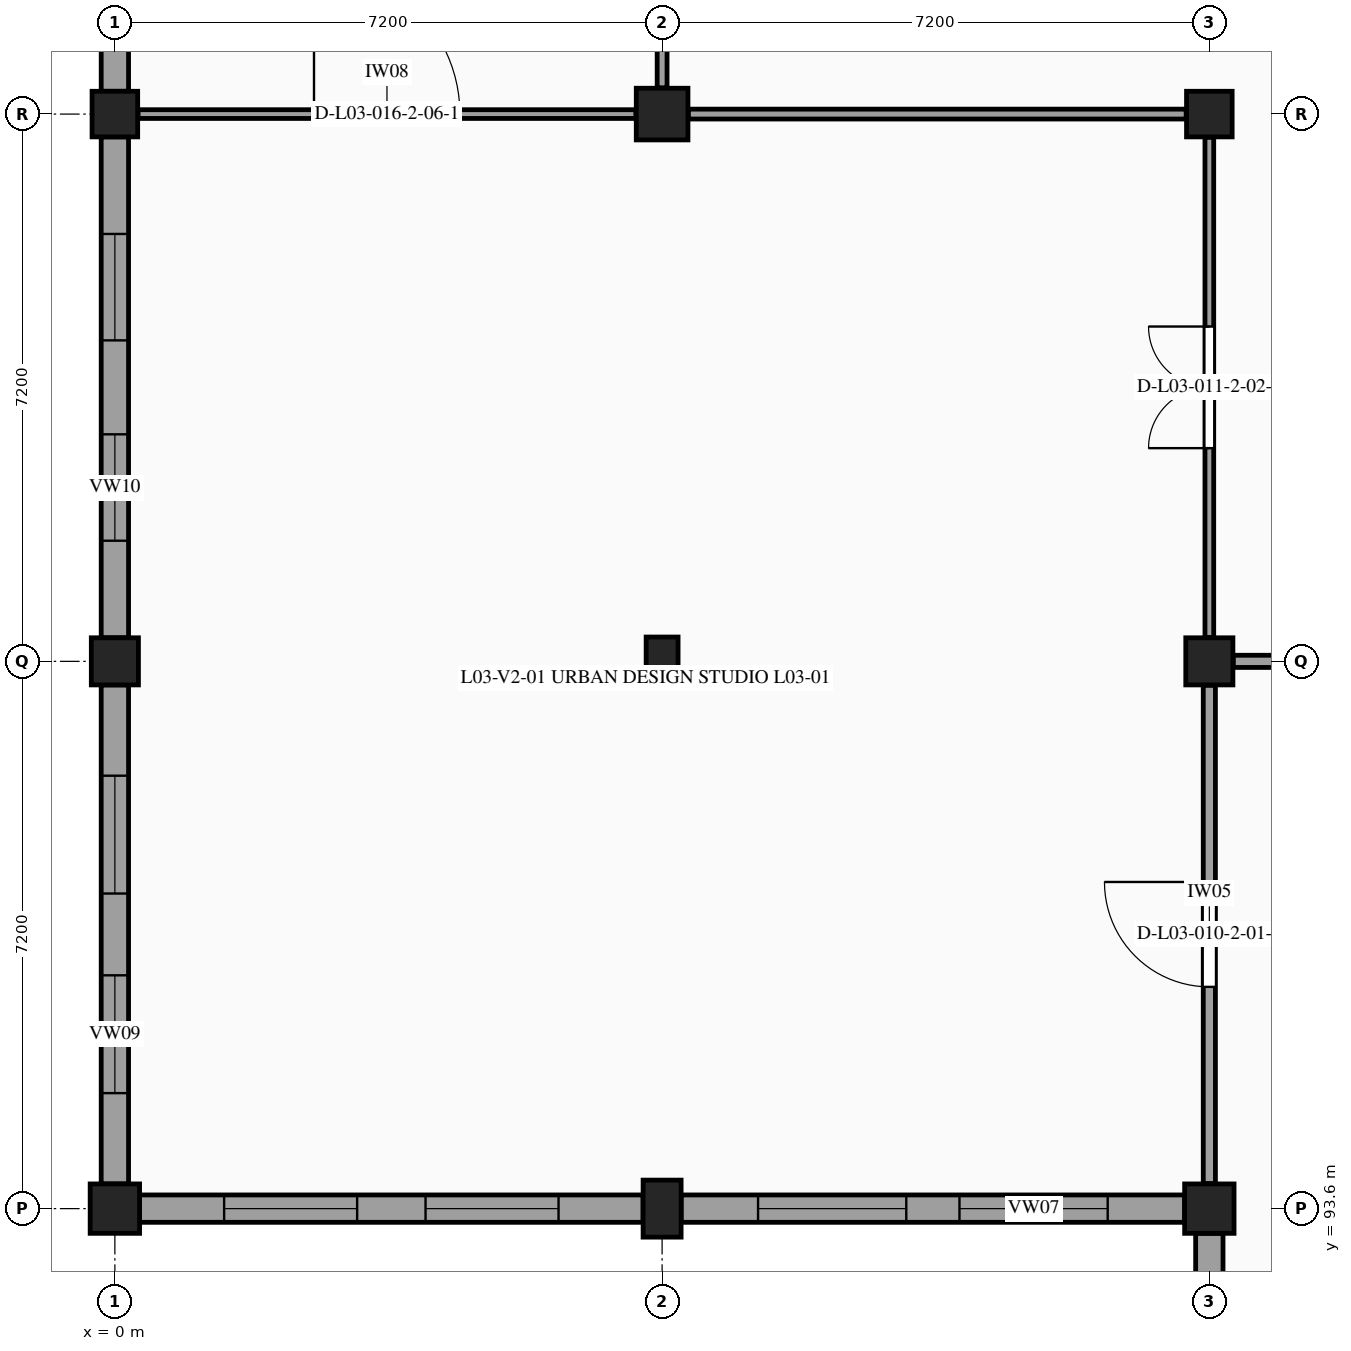
"""IFC4 building model, lengths in metres.
Left out: names, types, materials, properties, quantities, classifications, styles, units other than length and angle.
Written with IfcOpenShell. Run it as: python <this file> out.ifc"""

import sys

from ifc_helpers import new_model, si_unit, direction, frame, frame_2d, origin, origin_2d, place, context, subcontext, project, spatial, rectangle, extrude, element, fill, save


model = new_model("IFC4")
c1 = context("Model", 3, precision=1e-05, world=origin(), true_north=direction((0.0, 1.0)))
c2 = subcontext(c1, "Body", "Model", "MODEL_VIEW")
j1 = project(units=[si_unit("LENGTHUNIT", "METRE"), si_unit("PLANEANGLEUNIT", "RADIAN")], contexts=[c1])
p1 = place(None, origin())
s1 = spatial("IfcSite", under=j1, at=p1, CompositionType="ELEMENT")
p2 = place(p1, origin())
s2 = spatial("IfcBuilding", under=s1, at=p2, CompositionType="ELEMENT")
p3 = place(p2, frame((0.0, 0.0, 14.4)))
s3 = spatial("IfcBuildingStorey", under=s2, at=p3, CompositionType="ELEMENT", Elevation=14.4)
p4 = place(p3, frame((0.0, 93.6, 0.0), z_axis=(0.0, 0.0, 1.0), x_axis=(1.0, 0.0, 0.0)))
e1 = element("IfcColumn", 1, at=p4, inside=s3, PredefinedType="COLUMN", context=c2, shape_type="SweptSolid", body=[
    extrude(rectangle(XDim=0.65, YDim=0.65, at=origin_2d()), origin(), (0.0, 0.0, 1.0), 4.2),
])
p5 = place(p3, frame((0.0, 100.8, 0.0), z_axis=(0.0, 0.0, 1.0), x_axis=(1.0, 0.0, 0.0)))
e2 = element("IfcColumn", 2, at=p5, inside=s3, PredefinedType="COLUMN", context=c2, shape_type="SweptSolid", body=[
    extrude(rectangle(XDim=0.62, YDim=0.62, at=origin_2d()), origin(), (0.0, 0.0, 1.0), 4.2),
])
p6 = place(p3, frame((0.0, 108.0, 0.0), z_axis=(0.0, 0.0, 1.0), x_axis=(1.0, 0.0, 0.0)))
e3 = element("IfcColumn", 3, at=p6, inside=s3, PredefinedType="COLUMN", context=c2, shape_type="SweptSolid", body=[
    extrude(rectangle(XDim=0.6, YDim=0.6, at=origin_2d()), origin(), (0.0, 0.0, 1.0), 4.2),
])
p7 = place(p3, frame((7.2, 93.6, 0.0), z_axis=(0.0, 0.0, 1.0), x_axis=(1.0, 0.0, 0.0)))
e4 = element("IfcColumn", 4, at=p7, inside=s3, PredefinedType="COLUMN", context=c2, shape_type="SweptSolid", body=[
    extrude(rectangle(XDim=0.5, YDim=0.75, at=origin_2d()), origin(), (0.0, 0.0, 1.0), 4.2),
])
p8 = place(p3, frame((7.2, 100.8, 0.0), z_axis=(0.0, 0.0, 1.0), x_axis=(1.0, 0.0, 0.0)))
e5 = element("IfcColumn", 5, at=p8, inside=s3, PredefinedType="PILASTER", context=c2, shape_type="SweptSolid", body=[
    extrude(rectangle(XDim=0.42, YDim=0.64, at=origin_2d()), origin(), (0.0, 0.0, 1.0), 4.2),
])
p9 = place(p3, frame((7.2, 108.0, 0.0), z_axis=(0.0, 0.0, 1.0), x_axis=(1.0, 0.0, 0.0)))
e6 = element("IfcColumn", 6, at=p9, inside=s3, PredefinedType="COLUMN", context=c2, shape_type="SweptSolid", body=[
    extrude(rectangle(XDim=0.68, YDim=0.68, at=origin_2d()), origin(), (0.0, 0.0, 1.0), 4.2),
])
p10 = place(p3, frame((14.4, 93.6, 0.0), z_axis=(0.0, 0.0, 1.0), x_axis=(1.0, 0.0, 0.0)))
e7 = element("IfcColumn", 7, at=p10, inside=s3, PredefinedType="COLUMN", context=c2, shape_type="SweptSolid", body=[
    extrude(rectangle(XDim=0.65, YDim=0.65, at=origin_2d()), origin(), (0.0, 0.0, 1.0), 4.2),
])
p11 = place(p3, frame((14.4, 100.8, 0.0), z_axis=(0.0, 0.0, 1.0), x_axis=(1.0, 0.0, 0.0)))
e8 = element("IfcColumn", 8, at=p11, inside=s3, PredefinedType="COLUMN", context=c2, shape_type="SweptSolid", body=[
    extrude(rectangle(XDim=0.62, YDim=0.62, at=origin_2d()), origin(), (0.0, 0.0, 1.0), 4.2),
])
p12 = place(p3, frame((14.4, 108.0, 0.0), z_axis=(0.0, 0.0, 1.0), x_axis=(1.0, 0.0, 0.0)))
e9 = element("IfcColumn", 9, at=p12, inside=s3, PredefinedType="COLUMN", context=c2, shape_type="SweptSolid", body=[
    extrude(rectangle(XDim=0.6, YDim=0.6, at=origin_2d()), origin(), (0.0, 0.0, 1.0), 4.2),
])
p13 = place(p3, frame((14.4, 86.74, 0.0), z_axis=(0.0, 0.0, 1.0), x_axis=(0.0, 1.0, 0.0)))
e10 = element("IfcWall", 10, at=p13, inside=s3, PredefinedType="STANDARD", context=c2, shape_type="SweptSolid", body=[
    extrude(rectangle(XDim=6.535, YDim=0.36, at=frame_2d((3.268, 0.0))), origin(), (0.0, 0.0, 1.0), 3.135),
])
p14 = place(p13, frame((1.561, 0.0, 1.15)))
e11 = element("IfcOpeningElement", 11, at=p14, cuts=e10, PredefinedType="OPENING", context=c2, shape_type="SweptSolid", body=[
    extrude(rectangle(XDim=0.8, YDim=1.5, at=frame_2d((0.4, 0.75))), frame((0.0, 0.19, 0.0), z_axis=(0.0, -1.0, 0.0), x_axis=(1.0, 0.0, 0.0)), (0.0, 0.0, 1.0), 0.38),
])
p15 = place(p13, frame((4.175, 0.0, 1.15)))
e12 = element("IfcOpeningElement", 12, at=p15, cuts=e10, PredefinedType="OPENING", context=c2, shape_type="SweptSolid", body=[
    extrude(rectangle(XDim=0.8, YDim=1.5, at=frame_2d((0.4, 0.75))), frame((0.0, 0.19, 0.0), z_axis=(0.0, -1.0, 0.0), x_axis=(1.0, 0.0, 0.0)), (0.0, 0.0, 1.0), 0.38),
])
p16 = place(p3, frame((14.075, 93.6, 0.0), z_axis=(0.0, 0.0, 1.0), x_axis=(-1.0, 0.0, 0.0)))
e13 = element("IfcWall", 13, at=p16, inside=s3, PredefinedType="STANDARD", context=c2, shape_type="SweptSolid", body=[
    extrude(rectangle(XDim=6.625, YDim=0.36, at=frame_2d((3.312, 0.0))), origin(), (0.0, 0.0, 1.0), 3.185),
])
p17 = place(p16, frame((1.012, 0.0, 1.15)))
e14 = element("IfcOpeningElement", 14, at=p17, cuts=e13, PredefinedType="OPENING", context=c2, shape_type="SweptSolid", body=[
    extrude(rectangle(XDim=1.95, YDim=1.4, at=frame_2d((0.975, 0.7))), frame((0.0, 0.19, 0.0), z_axis=(0.0, -1.0, 0.0), x_axis=(1.0, 0.0, 0.0)), (0.0, 0.0, 1.0), 0.38),
])
p18 = place(p16, frame((3.663, 0.0, 1.15)))
e15 = element("IfcOpeningElement", 15, at=p18, cuts=e13, PredefinedType="OPENING", context=c2, shape_type="SweptSolid", body=[
    extrude(rectangle(XDim=1.95, YDim=1.4, at=frame_2d((0.975, 0.7))), frame((0.0, 0.19, 0.0), z_axis=(0.0, -1.0, 0.0), x_axis=(1.0, 0.0, 0.0)), (0.0, 0.0, 1.0), 0.38),
])
p19 = place(p3, frame((6.95, 93.6, 0.0), z_axis=(0.0, 0.0, 1.0), x_axis=(-1.0, 0.0, 0.0)))
e16 = element("IfcWall", 16, at=p19, inside=s3, PredefinedType="STANDARD", context=c2, shape_type="SweptSolid", body=[
    extrude(rectangle(XDim=6.625, YDim=0.36, at=frame_2d((3.312, 0.0))), origin(), (0.0, 0.0, 1.0), 3.185),
])
p20 = place(p19, frame((1.113, 0.0, 1.15)))
e17 = element("IfcOpeningElement", 17, at=p20, cuts=e16, PredefinedType="OPENING", context=c2, shape_type="SweptSolid", body=[
    extrude(rectangle(XDim=1.75, YDim=1.4, at=frame_2d((0.875, 0.7))), frame((0.0, 0.19, 0.0), z_axis=(0.0, -1.0, 0.0), x_axis=(1.0, 0.0, 0.0)), (0.0, 0.0, 1.0), 0.38),
])
p21 = place(p19, frame((3.762, 0.0, 1.15)))
e18 = element("IfcOpeningElement", 18, at=p21, cuts=e16, PredefinedType="OPENING", context=c2, shape_type="SweptSolid", body=[
    extrude(rectangle(XDim=1.75, YDim=1.4, at=frame_2d((0.875, 0.7))), frame((0.0, 0.19, 0.0), z_axis=(0.0, -1.0, 0.0), x_axis=(1.0, 0.0, 0.0)), (0.0, 0.0, 1.0), 0.38),
])
p22 = place(p3, frame((0.0, 93.925, 0.0), z_axis=(0.0, 0.0, 1.0), x_axis=(0.0, 1.0, 0.0)))
e19 = element("IfcWall", 19, at=p22, inside=s3, PredefinedType="STANDARD", context=c2, shape_type="SweptSolid", body=[
    extrude(rectangle(XDim=6.565, YDim=0.36, at=frame_2d((3.282, 0.0))), origin(), (0.0, 0.0, 1.0), 3.135),
])
p23 = place(p22, frame((1.195, 0.0, 1.15)))
e20 = element("IfcOpeningElement", 20, at=p23, cuts=e19, PredefinedType="OPENING", context=c2, shape_type="SweptSolid", body=[
    extrude(rectangle(XDim=1.55, YDim=1.35, at=frame_2d((0.775, 0.675))), frame((0.0, 0.19, 0.0), z_axis=(0.0, -1.0, 0.0), x_axis=(1.0, 0.0, 0.0)), (0.0, 0.0, 1.0), 0.38),
])
p24 = place(p22, frame((3.821, 0.0, 1.15)))
e21 = element("IfcOpeningElement", 21, at=p24, cuts=e19, PredefinedType="OPENING", context=c2, shape_type="SweptSolid", body=[
    extrude(rectangle(XDim=1.55, YDim=1.35, at=frame_2d((0.775, 0.675))), frame((0.0, 0.19, 0.0), z_axis=(0.0, -1.0, 0.0), x_axis=(1.0, 0.0, 0.0)), (0.0, 0.0, 1.0), 0.38),
])
p25 = place(p3, frame((0.0, 101.11, 0.0), z_axis=(0.0, 0.0, 1.0), x_axis=(0.0, 1.0, 0.0)))
e22 = element("IfcWall", 22, at=p25, inside=s3, PredefinedType="STANDARD", context=c2, shape_type="SweptSolid", body=[
    extrude(rectangle(XDim=6.59, YDim=0.36, at=frame_2d((3.295, 0.0))), origin(), (0.0, 0.0, 1.0), 3.135),
])
p26 = place(p25, frame((1.277, 0.0, 1.15)))
e23 = element("IfcOpeningElement", 23, at=p26, cuts=e22, PredefinedType="OPENING", context=c2, shape_type="SweptSolid", body=[
    extrude(rectangle(XDim=1.4, YDim=1.3, at=frame_2d((0.7, 0.65))), frame((0.0, 0.19, 0.0), z_axis=(0.0, -1.0, 0.0), x_axis=(1.0, 0.0, 0.0)), (0.0, 0.0, 1.0), 0.38),
])
p27 = place(p25, frame((3.913, 0.0, 1.15)))
e24 = element("IfcOpeningElement", 24, at=p27, cuts=e22, PredefinedType="OPENING", context=c2, shape_type="SweptSolid", body=[
    extrude(rectangle(XDim=1.4, YDim=1.3, at=frame_2d((0.7, 0.65))), frame((0.0, 0.19, 0.0), z_axis=(0.0, -1.0, 0.0), x_axis=(1.0, 0.0, 0.0)), (0.0, 0.0, 1.0), 0.38),
])
p28 = place(p3, frame((0.0, 108.3, 0.0), z_axis=(0.0, 0.0, 1.0), x_axis=(0.0, 1.0, 0.0)))
e25 = element("IfcWall", 25, at=p28, inside=s3, PredefinedType="STANDARD", context=c2, shape_type="SweptSolid", body=[
    extrude(rectangle(XDim=6.525, YDim=0.36, at=frame_2d((3.262, 0.0))), origin(), (0.0, 0.0, 1.0), 3.135),
])
p29 = place(p28, frame((1.333, 0.0, 1.15)))
e26 = element("IfcOpeningElement", 26, at=p29, cuts=e25, PredefinedType="OPENING", context=c2, shape_type="SweptSolid", body=[
    extrude(rectangle(XDim=1.25, YDim=1.25, at=frame_2d((0.625, 0.625))), frame((0.0, 0.19, 0.0), z_axis=(0.0, -1.0, 0.0), x_axis=(1.0, 0.0, 0.0)), (0.0, 0.0, 1.0), 0.38),
])
p30 = place(p28, frame((3.942, 0.0, 1.15)))
e27 = element("IfcOpeningElement", 27, at=p30, cuts=e25, PredefinedType="OPENING", context=c2, shape_type="SweptSolid", body=[
    extrude(rectangle(XDim=1.25, YDim=1.25, at=frame_2d((0.625, 0.625))), frame((0.0, 0.19, 0.0), z_axis=(0.0, -1.0, 0.0), x_axis=(1.0, 0.0, 0.0)), (0.0, 0.0, 1.0), 0.38),
])
p31 = place(p3, frame((0.305, 108.0, 0.0), z_axis=(0.0, 0.0, 1.0), x_axis=(1.0, 0.0, 0.0)))
e28 = element("IfcWall", 28, at=p31, inside=s3, PredefinedType="PARTITIONING", context=c2, shape_type="SweptSolid", body=[
    extrude(rectangle(XDim=6.55, YDim=0.115, at=frame_2d((3.275, 0.0))), origin(), (0.0, 0.0, 1.0), 3.215),
])
p32 = place(p31, frame((2.315, 0.0, 0.0)))
e29 = element("IfcOpeningElement", 29, at=p32, cuts=e28, PredefinedType="OPENING", context=c2, shape_type="SweptSolid", body=[
    extrude(rectangle(XDim=1.92, YDim=2.35, at=frame_2d((0.96, 1.175))), frame((0.0, 0.067, 0.0), z_axis=(0.0, -1.0, 0.0), x_axis=(1.0, 0.0, 0.0)), (0.0, 0.0, 1.0), 0.135),
])
p33 = place(p3, frame((7.2, 108.345, 0.0), z_axis=(0.0, 0.0, 1.0), x_axis=(0.0, 1.0, 0.0)))
e30 = element("IfcWall", 30, at=p33, inside=s3, PredefinedType="PARTITIONING", context=c2, shape_type="SweptSolid", body=[
    extrude(rectangle(XDim=6.525, YDim=0.13, at=frame_2d((3.263, 0.0))), origin(), (0.0, 0.0, 1.0), 3.245),
])
p34 = place(p3, frame((14.4, 93.93, 0.0), z_axis=(0.0, 0.0, 1.0), x_axis=(0.0, 1.0, 0.0)))
e31 = element("IfcWall", 31, at=p34, inside=s3, PredefinedType="PARTITIONING", context=c2, shape_type="SweptSolid", body=[
    extrude(rectangle(XDim=6.555, YDim=0.16, at=frame_2d((3.278, 0.0))), origin(), (0.0, 0.0, 1.0), 3.255),
])
p35 = place(p34, frame((2.587, 0.0, 0.0)))
e32 = element("IfcOpeningElement", 32, at=p35, cuts=e31, PredefinedType="OPENING", context=c2, shape_type="SweptSolid", body=[
    extrude(rectangle(XDim=1.38, YDim=2.22, at=frame_2d((0.69, 1.11))), frame((0.0, 0.09, 0.0), z_axis=(0.0, -1.0, 0.0), x_axis=(1.0, 0.0, 0.0)), (0.0, 0.0, 1.0), 0.18),
])
p36 = place(p3, frame((14.4, 101.115, 0.0), z_axis=(0.0, 0.0, 1.0), x_axis=(0.0, 1.0, 0.0)))
e33 = element("IfcWall", 33, at=p36, inside=s3, PredefinedType="PARTITIONING", context=c2, shape_type="SweptSolid", body=[
    extrude(rectangle(XDim=6.58, YDim=0.115, at=frame_2d((3.29, 0.0))), origin(), (0.0, 0.0, 1.0), 3.25),
])
p37 = place(p36, frame((2.49, 0.0, 0.0)))
e34 = element("IfcOpeningElement", 34, at=p37, cuts=e33, PredefinedType="OPENING", context=c2, shape_type="SweptSolid", body=[
    extrude(rectangle(XDim=1.6, YDim=2.2, at=frame_2d((0.8, 1.1))), frame((0.0, 0.067, 0.0), z_axis=(0.0, -1.0, 0.0), x_axis=(1.0, 0.0, 0.0)), (0.0, 0.0, 1.0), 0.135),
])
p38 = place(p3, frame((7.545, 108.0, 0.0), z_axis=(0.0, 0.0, 1.0), x_axis=(1.0, 0.0, 0.0)))
e35 = element("IfcWall", 35, at=p38, inside=s3, PredefinedType="PARTITIONING", context=c2, shape_type="SweptSolid", body=[
    extrude(rectangle(XDim=6.55, YDim=0.13, at=frame_2d((3.275, 0.0))), origin(), (0.0, 0.0, 1.0), 3.22),
])
p39 = place(p3, frame((14.715, 100.8, 0.0), z_axis=(0.0, 0.0, 1.0), x_axis=(1.0, 0.0, 0.0)))
e36 = element("IfcWall", 36, at=p39, inside=s3, PredefinedType="PARTITIONING", context=c2, shape_type="SweptSolid", body=[
    extrude(rectangle(XDim=6.67, YDim=0.16, at=frame_2d((3.335, 0.0))), origin(), (0.0, 0.0, 1.0), 3.24),
])
p40 = place(p17, origin())
e37 = element("IfcWindow", 37, at=p40, inside=s3, PartitioningType="SINGLE_PANEL", PredefinedType="WINDOW", context=c2, shape_type="SweptSolid", body=[
    extrude(rectangle(XDim=1.95, YDim=1.4, at=frame_2d((0.975, 0.7))), frame((0.0, -0.08, 0.0), z_axis=(0.0, -1.0, 0.0), x_axis=(1.0, 0.0, 0.0)), (0.0, 0.0, 1.0), 0.06),
])
fill(e14, e37)
p41 = place(p18, origin())
e38 = element("IfcWindow", 38, at=p41, inside=s3, PartitioningType="SINGLE_PANEL", PredefinedType="WINDOW", context=c2, shape_type="SweptSolid", body=[
    extrude(rectangle(XDim=1.95, YDim=1.4, at=frame_2d((0.975, 0.7))), frame((0.0, -0.08, 0.0), z_axis=(0.0, -1.0, 0.0), x_axis=(1.0, 0.0, 0.0)), (0.0, 0.0, 1.0), 0.06),
])
fill(e15, e38)
p42 = place(p20, origin())
e39 = element("IfcWindow", 39, at=p42, inside=s3, PartitioningType="SINGLE_PANEL", PredefinedType="WINDOW", context=c2, shape_type="SweptSolid", body=[
    extrude(rectangle(XDim=1.75, YDim=1.4, at=frame_2d((0.875, 0.7))), frame((0.0, -0.08, 0.0), z_axis=(0.0, -1.0, 0.0), x_axis=(1.0, 0.0, 0.0)), (0.0, 0.0, 1.0), 0.06),
])
fill(e17, e39)
p43 = place(p21, origin())
e40 = element("IfcWindow", 40, at=p43, inside=s3, PartitioningType="SINGLE_PANEL", PredefinedType="WINDOW", context=c2, shape_type="SweptSolid", body=[
    extrude(rectangle(XDim=1.75, YDim=1.4, at=frame_2d((0.875, 0.7))), frame((0.0, -0.08, 0.0), z_axis=(0.0, -1.0, 0.0), x_axis=(1.0, 0.0, 0.0)), (0.0, 0.0, 1.0), 0.06),
])
fill(e18, e40)
p44 = place(p23, origin())
e41 = element("IfcWindow", 41, at=p44, inside=s3, PartitioningType="SINGLE_PANEL", PredefinedType="WINDOW", context=c2, shape_type="SweptSolid", body=[
    extrude(rectangle(XDim=1.55, YDim=1.35, at=frame_2d((0.775, 0.675))), frame((0.0, -0.08, 0.0), z_axis=(0.0, -1.0, 0.0), x_axis=(1.0, 0.0, 0.0)), (0.0, 0.0, 1.0), 0.06),
])
fill(e20, e41)
p45 = place(p24, origin())
e42 = element("IfcWindow", 42, at=p45, inside=s3, PartitioningType="SINGLE_PANEL", PredefinedType="WINDOW", context=c2, shape_type="SweptSolid", body=[
    extrude(rectangle(XDim=1.55, YDim=1.35, at=frame_2d((0.775, 0.675))), frame((0.0, -0.08, 0.0), z_axis=(0.0, -1.0, 0.0), x_axis=(1.0, 0.0, 0.0)), (0.0, 0.0, 1.0), 0.06),
])
fill(e21, e42)
p46 = place(p26, origin())
e43 = element("IfcWindow", 43, at=p46, inside=s3, PartitioningType="SINGLE_PANEL", PredefinedType="WINDOW", context=c2, shape_type="SweptSolid", body=[
    extrude(rectangle(XDim=1.4, YDim=1.3, at=frame_2d((0.7, 0.65))), frame((0.0, -0.08, 0.0), z_axis=(0.0, -1.0, 0.0), x_axis=(1.0, 0.0, 0.0)), (0.0, 0.0, 1.0), 0.06),
])
fill(e23, e43)
p47 = place(p27, origin())
e44 = element("IfcWindow", 44, at=p47, inside=s3, PartitioningType="SINGLE_PANEL", PredefinedType="WINDOW", context=c2, shape_type="SweptSolid", body=[
    extrude(rectangle(XDim=1.4, YDim=1.3, at=frame_2d((0.7, 0.65))), frame((0.0, -0.08, 0.0), z_axis=(0.0, -1.0, 0.0), x_axis=(1.0, 0.0, 0.0)), (0.0, 0.0, 1.0), 0.06),
])
fill(e24, e44)
p48 = place(p35, origin())
e45 = element("IfcDoor", 45, at=p48, inside=s3, OperationType="SINGLE_SWING_RIGHT", PredefinedType="DOOR", context=c2, shape_type="SweptSolid", body=[
    extrude(rectangle(XDim=1.38, YDim=2.22, at=frame_2d((0.69, 1.11))), frame((0.0, 0.025, 0.0), z_axis=(0.0, -1.0, 0.0), x_axis=(1.0, 0.0, 0.0)), (0.0, 0.0, 1.0), 0.05),
])
fill(e32, e45)
p49 = place(p37, origin())
e46 = element("IfcDoor", 46, at=p49, inside=s3, OperationType="DOUBLE_DOOR_SINGLE_SWING", PredefinedType="DOOR", context=c2, shape_type="SweptSolid", body=[
    extrude(rectangle(XDim=1.6, YDim=2.2, at=frame_2d((0.8, 1.1))), frame((0.0, 0.025, 0.0), z_axis=(0.0, -1.0, 0.0), x_axis=(1.0, 0.0, 0.0)), (0.0, 0.0, 1.0), 0.05),
])
fill(e34, e46)
p50 = place(p32, origin())
e47 = element("IfcDoor", 47, at=p50, inside=s3, OperationType="SINGLE_SWING_LEFT", PredefinedType="DOOR", context=c2, shape_type="SweptSolid", body=[
    extrude(rectangle(XDim=1.92, YDim=2.35, at=frame_2d((0.96, 1.175))), frame((0.0, 0.025, 0.0), z_axis=(0.0, -1.0, 0.0), x_axis=(1.0, 0.0, 0.0)), (0.0, 0.0, 1.0), 0.05),
])
fill(e29, e47)
save(model, sys.argv[1])
